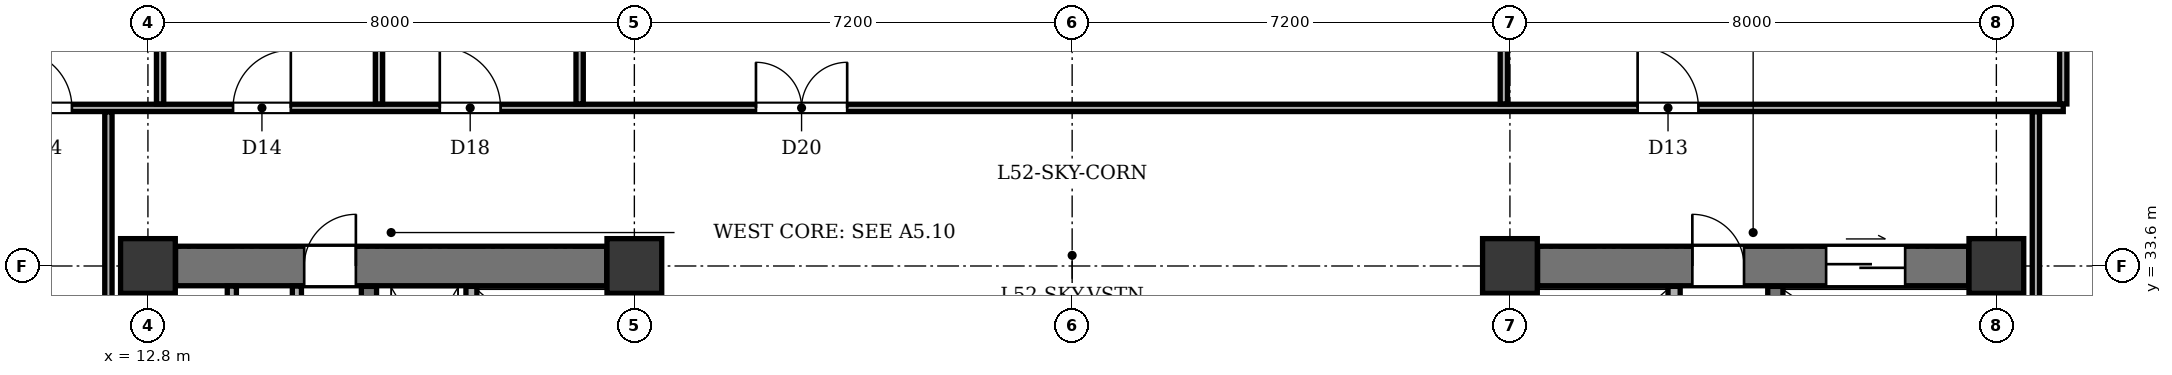
"""IFC4 building model, lengths in metres.
Left out: names, types, materials, properties, quantities, classifications, styles, units other than length and angle.
Written with IfcOpenShell. Run it as: python <this file> out.ifc"""

import sys

from ifc_helpers import new_model, si_unit, direction, frame, frame_2d, origin, origin_2d, place, context, subcontext, project, spatial, rectangle, extrude, element, fill, save


model = new_model("IFC4")
c1 = context("Model", 3, precision=1e-05, world=origin(), true_north=direction((0.0, 1.0)))
c2 = subcontext(c1, "Body", "Model", "MODEL_VIEW")
j1 = project(units=[si_unit("LENGTHUNIT", "METRE"), si_unit("PLANEANGLEUNIT", "RADIAN")], contexts=[c1])
p1 = place(None, origin())
s1 = spatial("IfcSite", under=j1, at=p1, CompositionType="ELEMENT")
p2 = place(p1, origin())
s2 = spatial("IfcBuilding", under=s1, at=p2, CompositionType="ELEMENT")
p3 = place(p2, frame((0.0, 0.0, 202.7)))
s3 = spatial("IfcBuildingStorey", under=s2, at=p3, CompositionType="ELEMENT", Elevation=202.7)
for number, where, z_axis, x_axis in (
    (1, (12.8, 33.6, 0.0), (0.0, 0.0, 1.0), (1.0, 0.0, 0.0)),
    (2, (20.8, 33.6, 0.0), (0.0, 0.0, 1.0), (1.0, 0.0, 0.0)),
    (3, (35.2, 33.6, 0.0), (0.0, 0.0, 1.0), (1.0, 0.0, 0.0)),
    (4, (43.2, 33.6, 0.0), (0.0, 0.0, 1.0), (1.0, 0.0, 0.0)),
):
    element("IfcColumn", number, at=place(p3, frame(where, z_axis=z_axis, x_axis=x_axis)), inside=s3, PredefinedType="COLUMN", context=c2, shape_type="SweptSolid", body=[
        extrude(rectangle(XDim=0.9, YDim=0.9, at=origin_2d()), origin(), (0.0, 0.0, 1.0), 4.8),
    ])
p4 = place(p3, frame((12.8, 21.255, 0.0), z_axis=(0.0, 0.0, 1.0), x_axis=(0.0, 1.0, 0.0)))
e5 = element("IfcWall", 5, at=p4, inside=s3, PredefinedType="SHEAR", context=c2, shape_type="SweptSolid", body=[
    extrude(rectangle(XDim=11.89, YDim=0.65, at=frame_2d((5.945, 0.0))), origin(), (0.0, 0.0, 1.0), 4.35),
])
p5 = place(p3, frame((13.255, 33.6, 0.0), z_axis=(0.0, 0.0, 1.0), x_axis=(1.0, 0.0, 0.0)))
e6 = element("IfcWall", 6, at=p5, inside=s3, PredefinedType="SHEAR", context=c2, shape_type="SweptSolid", body=[
    extrude(rectangle(XDim=7.09, YDim=0.65, at=frame_2d((3.545, 0.0))), origin(), (0.0, 0.0, 1.0), 4.35),
])
p6 = place(p5, frame((2.115, 0.0, 0.0)))
e7 = element("IfcOpeningElement", 7, at=p6, cuts=e6, PredefinedType="OPENING", context=c2, shape_type="SweptSolid", body=[
    extrude(rectangle(XDim=0.85, YDim=2.02, at=frame_2d((0.425, 1.01))), frame((0.0, 0.335, 0.0), z_axis=(0.0, -1.0, 0.0), x_axis=(1.0, 0.0, 0.0)), (0.0, 0.0, 1.0), 0.67),
])
p7 = place(p3, frame((20.8, 31.1, 0.0), z_axis=(0.0, 0.0, 1.0), x_axis=(0.0, 1.0, 0.0)))
e8 = element("IfcWall", 8, at=p7, inside=s3, PredefinedType="SHEAR", context=c2, shape_type="SweptSolid", body=[
    extrude(rectangle(XDim=2.045, YDim=0.65, at=frame_2d((1.022, 0.0))), origin(), (0.0, 0.0, 1.0), 4.35),
])
p8 = place(p7, frame((0.4, 0.0, 0.0)))
e9 = element("IfcOpeningElement", 9, at=p8, cuts=e8, PredefinedType="OPENING", context=c2, shape_type="SweptSolid", body=[
    extrude(rectangle(XDim=1.1, YDim=2.1, at=frame_2d((0.55, 1.05))), frame((0.0, 0.335, 0.0), z_axis=(0.0, -1.0, 0.0), x_axis=(1.0, 0.0, 0.0)), (0.0, 0.0, 1.0), 0.67),
])
p9 = place(p3, frame((16.435, 21.135, 0.0), z_axis=(0.0, 0.0, 1.0), x_axis=(0.0, 1.0, 0.0)))
e10 = element("IfcWall", 10, at=p9, inside=s3, PredefinedType="SHEAR", context=c2, shape_type="SweptSolid", body=[
    extrude(rectangle(XDim=12.13, YDim=0.25, at=frame_2d((6.065, 0.0))), origin(), (0.0, 0.0, 1.0), 4.35),
])
p10 = place(p9, frame((0.515, 0.0, 0.0)))
e11 = element("IfcOpeningElement", 11, at=p10, cuts=e10, PredefinedType="OPENING", context=c2, shape_type="SweptSolid", body=[
    extrude(rectangle(XDim=1.2, YDim=2.15, at=frame_2d((0.6, 1.075))), frame((0.0, 0.135, 0.0), z_axis=(0.0, -1.0, 0.0), x_axis=(1.0, 0.0, 0.0)), (0.0, 0.0, 1.0), 0.27),
])
p11 = place(p9, frame((2.665, 0.0, 0.0)))
e12 = element("IfcOpeningElement", 12, at=p11, cuts=e10, PredefinedType="OPENING", context=c2, shape_type="SweptSolid", body=[
    extrude(rectangle(XDim=1.15, YDim=2.15, at=frame_2d((0.575, 1.075))), frame((0.0, 0.135, 0.0), z_axis=(0.0, -1.0, 0.0), x_axis=(1.0, 0.0, 0.0)), (0.0, 0.0, 1.0), 0.27),
])
p12 = place(p3, frame((18.12, 31.17, 0.0), z_axis=(0.0, 0.0, 1.0), x_axis=(0.0, 1.0, 0.0)))
e13 = element("IfcWall", 13, at=p12, inside=s3, PredefinedType="PARTITIONING", context=c2, shape_type="SweptSolid", body=[
    extrude(rectangle(XDim=2.095, YDim=0.18, at=frame_2d((1.047, 0.0))), origin(), (0.0, 0.0, 1.0), 4.35),
])
p13 = place(p3, frame((43.2, 21.255, 0.0), z_axis=(0.0, 0.0, 1.0), x_axis=(0.0, 1.0, 0.0)))
e14 = element("IfcWall", 14, at=p13, inside=s3, PredefinedType="SHEAR", context=c2, shape_type="SweptSolid", body=[
    extrude(rectangle(XDim=11.89, YDim=0.65, at=frame_2d((5.945, 0.0))), origin(), (0.0, 0.0, 1.0), 4.35),
])
p14 = place(p3, frame((35.655, 33.6, 0.0), z_axis=(0.0, 0.0, 1.0), x_axis=(1.0, 0.0, 0.0)))
e15 = element("IfcWall", 15, at=p14, inside=s3, PredefinedType="SHEAR", context=c2, shape_type="SweptSolid", body=[
    extrude(rectangle(XDim=7.09, YDim=0.65, at=frame_2d((3.545, 0.0))), origin(), (0.0, 0.0, 1.0), 4.35),
])
p15 = place(p14, frame((4.745, 0.0, 0.0)))
e16 = element("IfcOpeningElement", 16, at=p15, cuts=e15, PredefinedType="OPENING", context=c2, shape_type="SweptSolid", body=[
    extrude(rectangle(XDim=1.3, YDim=2.15, at=frame_2d((0.65, 1.075))), frame((0.0, 0.335, 0.0), z_axis=(0.0, -1.0, 0.0), x_axis=(1.0, 0.0, 0.0)), (0.0, 0.0, 1.0), 0.67),
])
p16 = place(p14, frame((2.545, 0.0, 0.0)))
e17 = element("IfcOpeningElement", 17, at=p16, cuts=e15, PredefinedType="OPENING", context=c2, shape_type="SweptSolid", body=[
    extrude(rectangle(XDim=0.85, YDim=2.02, at=frame_2d((0.425, 1.01))), frame((0.0, 0.335, 0.0), z_axis=(0.0, -1.0, 0.0), x_axis=(1.0, 0.0, 0.0)), (0.0, 0.0, 1.0), 0.67),
])
p17 = place(p3, frame((35.2, 21.255, 0.0), z_axis=(0.0, 0.0, 1.0), x_axis=(0.0, 1.0, 0.0)))
e18 = element("IfcWall", 18, at=p17, inside=s3, PredefinedType="SHEAR", context=c2, shape_type="SweptSolid", body=[
    extrude(rectangle(XDim=11.89, YDim=0.65, at=frame_2d((5.945, 0.0))), origin(), (0.0, 0.0, 1.0), 4.35),
])
p18 = place(p17, frame((1.345, 0.0, 0.0)))
e19 = element("IfcOpeningElement", 19, at=p18, cuts=e18, PredefinedType="OPENING", context=c2, shape_type="SweptSolid", body=[
    extrude(rectangle(XDim=1.2, YDim=2.15, at=frame_2d((0.6, 1.075))), frame((0.0, 0.335, 0.0), z_axis=(0.0, -1.0, 0.0), x_axis=(1.0, 0.0, 0.0)), (0.0, 0.0, 1.0), 0.67),
])
p19 = place(p17, frame((4.345, 0.0, 0.0)))
e20 = element("IfcOpeningElement", 20, at=p19, cuts=e18, PredefinedType="OPENING", context=c2, shape_type="SweptSolid", body=[
    extrude(rectangle(XDim=1.1, YDim=2.1, at=frame_2d((0.55, 1.05))), frame((0.0, 0.335, 0.0), z_axis=(0.0, -1.0, 0.0), x_axis=(1.0, 0.0, 0.0)), (0.0, 0.0, 1.0), 0.67),
])
p20 = place(p17, frame((6.295, 0.0, 0.0)))
e21 = element("IfcOpeningElement", 21, at=p20, cuts=e18, PredefinedType="OPENING", context=c2, shape_type="SweptSolid", body=[
    extrude(rectangle(XDim=1.1, YDim=2.1, at=frame_2d((0.55, 1.05))), frame((0.0, 0.335, 0.0), z_axis=(0.0, -1.0, 0.0), x_axis=(1.0, 0.0, 0.0)), (0.0, 0.0, 1.0), 0.67),
])
p21 = place(p17, frame((8.245, 0.0, 0.0)))
e22 = element("IfcOpeningElement", 22, at=p21, cuts=e18, PredefinedType="OPENING", context=c2, shape_type="SweptSolid", body=[
    extrude(rectangle(XDim=1.1, YDim=2.1, at=frame_2d((0.55, 1.05))), frame((0.0, 0.335, 0.0), z_axis=(0.0, -1.0, 0.0), x_axis=(1.0, 0.0, 0.0)), (0.0, 0.0, 1.0), 0.67),
])
p22 = place(p17, frame((10.445, 0.0, 0.0)))
e23 = element("IfcOpeningElement", 23, at=p22, cuts=e18, PredefinedType="OPENING", context=c2, shape_type="SweptSolid", body=[
    extrude(rectangle(XDim=1.1, YDim=2.1, at=frame_2d((0.55, 1.05))), frame((0.0, 0.335, 0.0), z_axis=(0.0, -1.0, 0.0), x_axis=(1.0, 0.0, 0.0)), (0.0, 0.0, 1.0), 0.67),
])
p23 = place(p3, frame((39.565, 21.135, 0.0), z_axis=(0.0, 0.0, 1.0), x_axis=(0.0, 1.0, 0.0)))
e24 = element("IfcWall", 24, at=p23, inside=s3, PredefinedType="SHEAR", context=c2, shape_type="SweptSolid", body=[
    extrude(rectangle(XDim=12.13, YDim=0.25, at=frame_2d((6.065, 0.0))), origin(), (0.0, 0.0, 1.0), 4.35),
])
p24 = place(p23, frame((0.515, 0.0, 0.0)))
e25 = element("IfcOpeningElement", 25, at=p24, cuts=e24, PredefinedType="OPENING", context=c2, shape_type="SweptSolid", body=[
    extrude(rectangle(XDim=1.2, YDim=2.15, at=frame_2d((0.6, 1.075))), frame((0.0, 0.135, 0.0), z_axis=(0.0, -1.0, 0.0), x_axis=(1.0, 0.0, 0.0)), (0.0, 0.0, 1.0), 0.27),
])
p25 = place(p23, frame((2.665, 0.0, 0.0)))
e26 = element("IfcOpeningElement", 26, at=p25, cuts=e24, PredefinedType="OPENING", context=c2, shape_type="SweptSolid", body=[
    extrude(rectangle(XDim=1.15, YDim=2.15, at=frame_2d((0.575, 1.075))), frame((0.0, 0.135, 0.0), z_axis=(0.0, -1.0, 0.0), x_axis=(1.0, 0.0, 0.0)), (0.0, 0.0, 1.0), 0.27),
])
p26 = place(p3, frame((37.9, 25.27, 0.0), z_axis=(0.0, 0.0, 1.0), x_axis=(0.0, 1.0, 0.0)))
e27 = element("IfcWall", 27, at=p26, inside=s3, PredefinedType="SOLIDWALL", context=c2, shape_type="SweptSolid", body=[
    extrude(rectangle(XDim=7.995, YDim=0.2, at=frame_2d((3.998, 0.0))), origin(), (0.0, 0.0, 1.0), 4.35),
])
p27 = place(p3, frame((14.18, 30.96, 0.0), z_axis=(0.0, 0.0, 1.0), x_axis=(0.0, 1.0, 0.0)))
e28 = element("IfcWall", 28, at=p27, inside=s3, PredefinedType="PARTITIONING", context=c2, shape_type="SweptSolid", body=[
    extrude(rectangle(XDim=2.31, YDim=0.15, at=frame_2d((1.155, 0.0))), origin(), (0.0, 0.0, 1.0), 4.35),
])
p28 = place(p27, frame((0.47, 0.0, 0.0)))
e29 = element("IfcOpeningElement", 29, at=p28, cuts=e28, PredefinedType="OPENING", context=c2, shape_type="SweptSolid", body=[
    extrude(rectangle(XDim=0.85, YDim=2.02, at=frame_2d((0.425, 1.01))), frame((0.0, 0.085, 0.0), z_axis=(0.0, -1.0, 0.0), x_axis=(1.0, 0.0, 0.0)), (0.0, 0.0, 1.0), 0.17),
])
p29 = place(p3, frame((15.25, 30.96, 0.0), z_axis=(0.0, 0.0, 1.0), x_axis=(0.0, 1.0, 0.0)))
e30 = element("IfcWall", 30, at=p29, inside=s3, PredefinedType="PARTITIONING", context=c2, shape_type="SweptSolid", body=[
    extrude(rectangle(XDim=2.31, YDim=0.15, at=frame_2d((1.155, 0.0))), origin(), (0.0, 0.0, 1.0), 4.35),
])
p30 = place(p29, frame((0.47, 0.0, 0.0)))
e31 = element("IfcOpeningElement", 31, at=p30, cuts=e30, PredefinedType="OPENING", context=c2, shape_type="SweptSolid", body=[
    extrude(rectangle(XDim=0.85, YDim=2.02, at=frame_2d((0.425, 1.01))), frame((0.0, 0.085, 0.0), z_axis=(0.0, -1.0, 0.0), x_axis=(1.0, 0.0, 0.0)), (0.0, 0.0, 1.0), 0.17),
])
p31 = place(p3, frame((9.3, 36.2, 0.0), z_axis=(0.0, 0.0, 1.0), x_axis=(1.0, 0.0, 0.0)))
e32 = element("IfcWall", 32, at=p31, inside=s3, PredefinedType="PARTITIONING", context=c2, shape_type="SweptSolid", body=[
    extrude(rectangle(XDim=35.0, YDim=0.12, at=frame_2d((17.5, 0.0))), origin(), (0.0, 0.0, 1.0), 4.35),
])
p32 = place(p31, frame((1.3, 0.0, 0.0)))
e33 = element("IfcOpeningElement", 33, at=p32, cuts=e32, PredefinedType="OPENING", context=c2, shape_type="SweptSolid", body=[
    extrude(rectangle(XDim=0.95, YDim=2.1, at=frame_2d((0.475, 1.05))), frame((0.0, 0.07, 0.0), z_axis=(0.0, -1.0, 0.0), x_axis=(1.0, 0.0, 0.0)), (0.0, 0.0, 1.0), 0.14),
])
p33 = place(p31, frame((4.9, 0.0, 0.0)))
e34 = element("IfcOpeningElement", 34, at=p33, cuts=e32, PredefinedType="OPENING", context=c2, shape_type="SweptSolid", body=[
    extrude(rectangle(XDim=0.95, YDim=2.1, at=frame_2d((0.475, 1.05))), frame((0.0, 0.07, 0.0), z_axis=(0.0, -1.0, 0.0), x_axis=(1.0, 0.0, 0.0)), (0.0, 0.0, 1.0), 0.14),
])
p34 = place(p31, frame((8.3, 0.0, 0.0)))
e35 = element("IfcOpeningElement", 35, at=p34, cuts=e32, PredefinedType="OPENING", context=c2, shape_type="SweptSolid", body=[
    extrude(rectangle(XDim=1.0, YDim=2.1, at=frame_2d((0.5, 1.05))), frame((0.0, 0.07, 0.0), z_axis=(0.0, -1.0, 0.0), x_axis=(1.0, 0.0, 0.0)), (0.0, 0.0, 1.0), 0.14),
])
p35 = place(p31, frame((13.5, 0.0, 0.0)))
e36 = element("IfcOpeningElement", 36, at=p35, cuts=e32, PredefinedType="OPENING", context=c2, shape_type="SweptSolid", body=[
    extrude(rectangle(XDim=1.5, YDim=2.15, at=frame_2d((0.75, 1.075))), frame((0.0, 0.07, 0.0), z_axis=(0.0, -1.0, 0.0), x_axis=(1.0, 0.0, 0.0)), (0.0, 0.0, 1.0), 0.14),
])
p36 = place(p31, frame((28.0, 0.0, 0.0)))
e37 = element("IfcOpeningElement", 37, at=p36, cuts=e32, PredefinedType="OPENING", context=c2, shape_type="SweptSolid", body=[
    extrude(rectangle(XDim=1.0, YDim=2.1, at=frame_2d((0.5, 1.05))), frame((0.0, 0.07, 0.0), z_axis=(0.0, -1.0, 0.0), x_axis=(1.0, 0.0, 0.0)), (0.0, 0.0, 1.0), 0.14),
])
p37 = place(p3, frame((13.0, 36.265, 0.0), z_axis=(0.0, 0.0, 1.0), x_axis=(0.0, 1.0, 0.0)))
e38 = element("IfcWall", 38, at=p37, inside=s3, PredefinedType="PARTITIONING", context=c2, shape_type="SweptSolid", body=[
    extrude(rectangle(XDim=16.29, YDim=0.12, at=frame_2d((8.145, 0.0))), origin(), (0.0, 0.0, 1.0), 4.35),
])
p38 = place(p3, frame((16.6, 36.265, 0.0), z_axis=(0.0, 0.0, 1.0), x_axis=(0.0, 1.0, 0.0)))
e39 = element("IfcWall", 39, at=p38, inside=s3, PredefinedType="PARTITIONING", context=c2, shape_type="SweptSolid", body=[
    extrude(rectangle(XDim=16.29, YDim=0.12, at=frame_2d((8.145, 0.0))), origin(), (0.0, 0.0, 1.0), 3.785),
])
for number, where, z_axis, x_axis in (
    (40, (19.9, 36.265, 0.0), (0.0, 0.0, 1.0), (0.0, 1.0, 0.0)),
    (41, (44.3, 36.265, 0.0), (0.0, 0.0, 1.0), (0.0, 1.0, 0.0)),
):
    element("IfcWall", number, at=place(p3, frame(where, z_axis=z_axis, x_axis=x_axis)), inside=s3, PredefinedType="PARTITIONING", context=c2, shape_type="SweptSolid", body=[
        extrude(rectangle(XDim=16.29, YDim=0.12, at=frame_2d((8.145, 0.0))), origin(), (0.0, 0.0, 1.0), 4.35),
    ])
p39 = place(p3, frame((35.1, 36.265, 0.0), z_axis=(0.0, 0.0, 1.0), x_axis=(0.0, 1.0, 0.0)))
e42 = element("IfcWall", 42, at=p39, inside=s3, PredefinedType="PARTITIONING", context=c2, shape_type="SweptSolid", body=[
    extrude(rectangle(XDim=16.29, YDim=0.12, at=frame_2d((8.145, 0.0))), origin(), (0.0, 0.0, 1.0), 3.535),
])
p40 = place(p3, frame((12.15, 18.465, 0.0), z_axis=(0.0, 0.0, 1.0), x_axis=(0.0, 1.0, 0.0)))
e43 = element("IfcWall", 43, at=p40, inside=s3, PredefinedType="PARTITIONING", context=c2, shape_type="SweptSolid", body=[
    extrude(rectangle(XDim=17.67, YDim=0.12, at=frame_2d((8.835, 0.0))), origin(), (0.0, 0.0, 1.0), 4.35),
])
p41 = place(p40, frame((0.385, 0.0, 0.0)))
e44 = element("IfcOpeningElement", 44, at=p41, cuts=e43, PredefinedType="OPENING", context=c2, shape_type="SweptSolid", body=[
    extrude(rectangle(XDim=1.1, YDim=2.15, at=frame_2d((0.55, 1.075))), frame((0.0, 0.07, 0.0), z_axis=(0.0, -1.0, 0.0), x_axis=(1.0, 0.0, 0.0)), (0.0, 0.0, 1.0), 0.14),
])
p42 = place(p3, frame((43.85, 18.465, 0.0), z_axis=(0.0, 0.0, 1.0), x_axis=(0.0, 1.0, 0.0)))
e45 = element("IfcWall", 45, at=p42, inside=s3, PredefinedType="PARTITIONING", context=c2, shape_type="SweptSolid", body=[
    extrude(rectangle(XDim=17.67, YDim=0.12, at=frame_2d((8.835, 0.0))), origin(), (0.0, 0.0, 1.0), 4.35),
])
p43 = place(p42, frame((0.385, 0.0, 0.0)))
e46 = element("IfcOpeningElement", 46, at=p43, cuts=e45, PredefinedType="OPENING", context=c2, shape_type="SweptSolid", body=[
    extrude(rectangle(XDim=1.1, YDim=2.15, at=frame_2d((0.55, 1.075))), frame((0.0, 0.07, 0.0), z_axis=(0.0, -1.0, 0.0), x_axis=(1.0, 0.0, 0.0)), (0.0, 0.0, 1.0), 0.14),
])
p44 = place(p6, origin())
e47 = element("IfcDoor", 47, at=p44, inside=s3, OperationType="SINGLE_SWING_RIGHT", PredefinedType="DOOR", context=c2, shape_type="SweptSolid", body=[
    extrude(rectangle(XDim=0.85, YDim=2.02, at=frame_2d((0.425, 1.01))), frame((0.0, 0.025, 0.0), z_axis=(0.0, -1.0, 0.0), x_axis=(1.0, 0.0, 0.0)), (0.0, 0.0, 1.0), 0.05),
])
fill(e7, e47)
p45 = place(p15, origin())
e48 = element("IfcDoor", 48, at=p45, inside=s3, OperationType="DOUBLE_DOOR_SLIDING", PredefinedType="DOOR", context=c2, shape_type="SweptSolid", body=[
    extrude(rectangle(XDim=1.3, YDim=2.15, at=frame_2d((0.65, 1.075))), frame((0.0, 0.025, 0.0), z_axis=(0.0, -1.0, 0.0), x_axis=(1.0, 0.0, 0.0)), (0.0, 0.0, 1.0), 0.05),
])
fill(e16, e48)
p46 = place(p16, origin())
e49 = element("IfcDoor", 49, at=p46, inside=s3, OperationType="SINGLE_SWING_LEFT", PredefinedType="DOOR", context=c2, shape_type="SweptSolid", body=[
    extrude(rectangle(XDim=0.85, YDim=2.02, at=frame_2d((0.425, 1.01))), frame((0.0, 0.025, 0.0), z_axis=(0.0, -1.0, 0.0), x_axis=(1.0, 0.0, 0.0)), (0.0, 0.0, 1.0), 0.05),
])
fill(e17, e49)
p47 = place(p32, origin())
e50 = element("IfcDoor", 50, at=p47, inside=s3, OperationType="SINGLE_SWING_LEFT", PredefinedType="DOOR", context=c2, shape_type="SweptSolid", body=[
    extrude(rectangle(XDim=0.95, YDim=2.1, at=frame_2d((0.475, 1.05))), frame((0.0, 0.025, 0.0), z_axis=(0.0, -1.0, 0.0), x_axis=(1.0, 0.0, 0.0)), (0.0, 0.0, 1.0), 0.05),
])
fill(e33, e50)
p48 = place(p33, origin())
e51 = element("IfcDoor", 51, at=p48, inside=s3, OperationType="SINGLE_SWING_RIGHT", PredefinedType="DOOR", context=c2, shape_type="SweptSolid", body=[
    extrude(rectangle(XDim=0.95, YDim=2.1, at=frame_2d((0.475, 1.05))), frame((0.0, 0.025, 0.0), z_axis=(0.0, -1.0, 0.0), x_axis=(1.0, 0.0, 0.0)), (0.0, 0.0, 1.0), 0.05),
])
fill(e34, e51)
p49 = place(p34, origin())
e52 = element("IfcDoor", 52, at=p49, inside=s3, OperationType="SINGLE_SWING_LEFT", PredefinedType="DOOR", context=c2, shape_type="SweptSolid", body=[
    extrude(rectangle(XDim=1.0, YDim=2.1, at=frame_2d((0.5, 1.05))), frame((0.0, 0.025, 0.0), z_axis=(0.0, -1.0, 0.0), x_axis=(1.0, 0.0, 0.0)), (0.0, 0.0, 1.0), 0.05),
])
fill(e35, e52)
p50 = place(p35, origin())
e53 = element("IfcDoor", 53, at=p50, inside=s3, OperationType="DOUBLE_DOOR_SINGLE_SWING", PredefinedType="DOOR", context=c2, shape_type="SweptSolid", body=[
    extrude(rectangle(XDim=1.5, YDim=2.15, at=frame_2d((0.75, 1.075))), frame((0.0, 0.025, 0.0), z_axis=(0.0, -1.0, 0.0), x_axis=(1.0, 0.0, 0.0)), (0.0, 0.0, 1.0), 0.05),
])
fill(e36, e53)
p51 = place(p36, origin())
e54 = element("IfcDoor", 54, at=p51, inside=s3, OperationType="SINGLE_SWING_LEFT", PredefinedType="DOOR", context=c2, shape_type="SweptSolid", body=[
    extrude(rectangle(XDim=1.0, YDim=2.1, at=frame_2d((0.5, 1.05))), frame((0.0, 0.025, 0.0), z_axis=(0.0, -1.0, 0.0), x_axis=(1.0, 0.0, 0.0)), (0.0, 0.0, 1.0), 0.05),
])
fill(e37, e54)
save(model, sys.argv[1])
